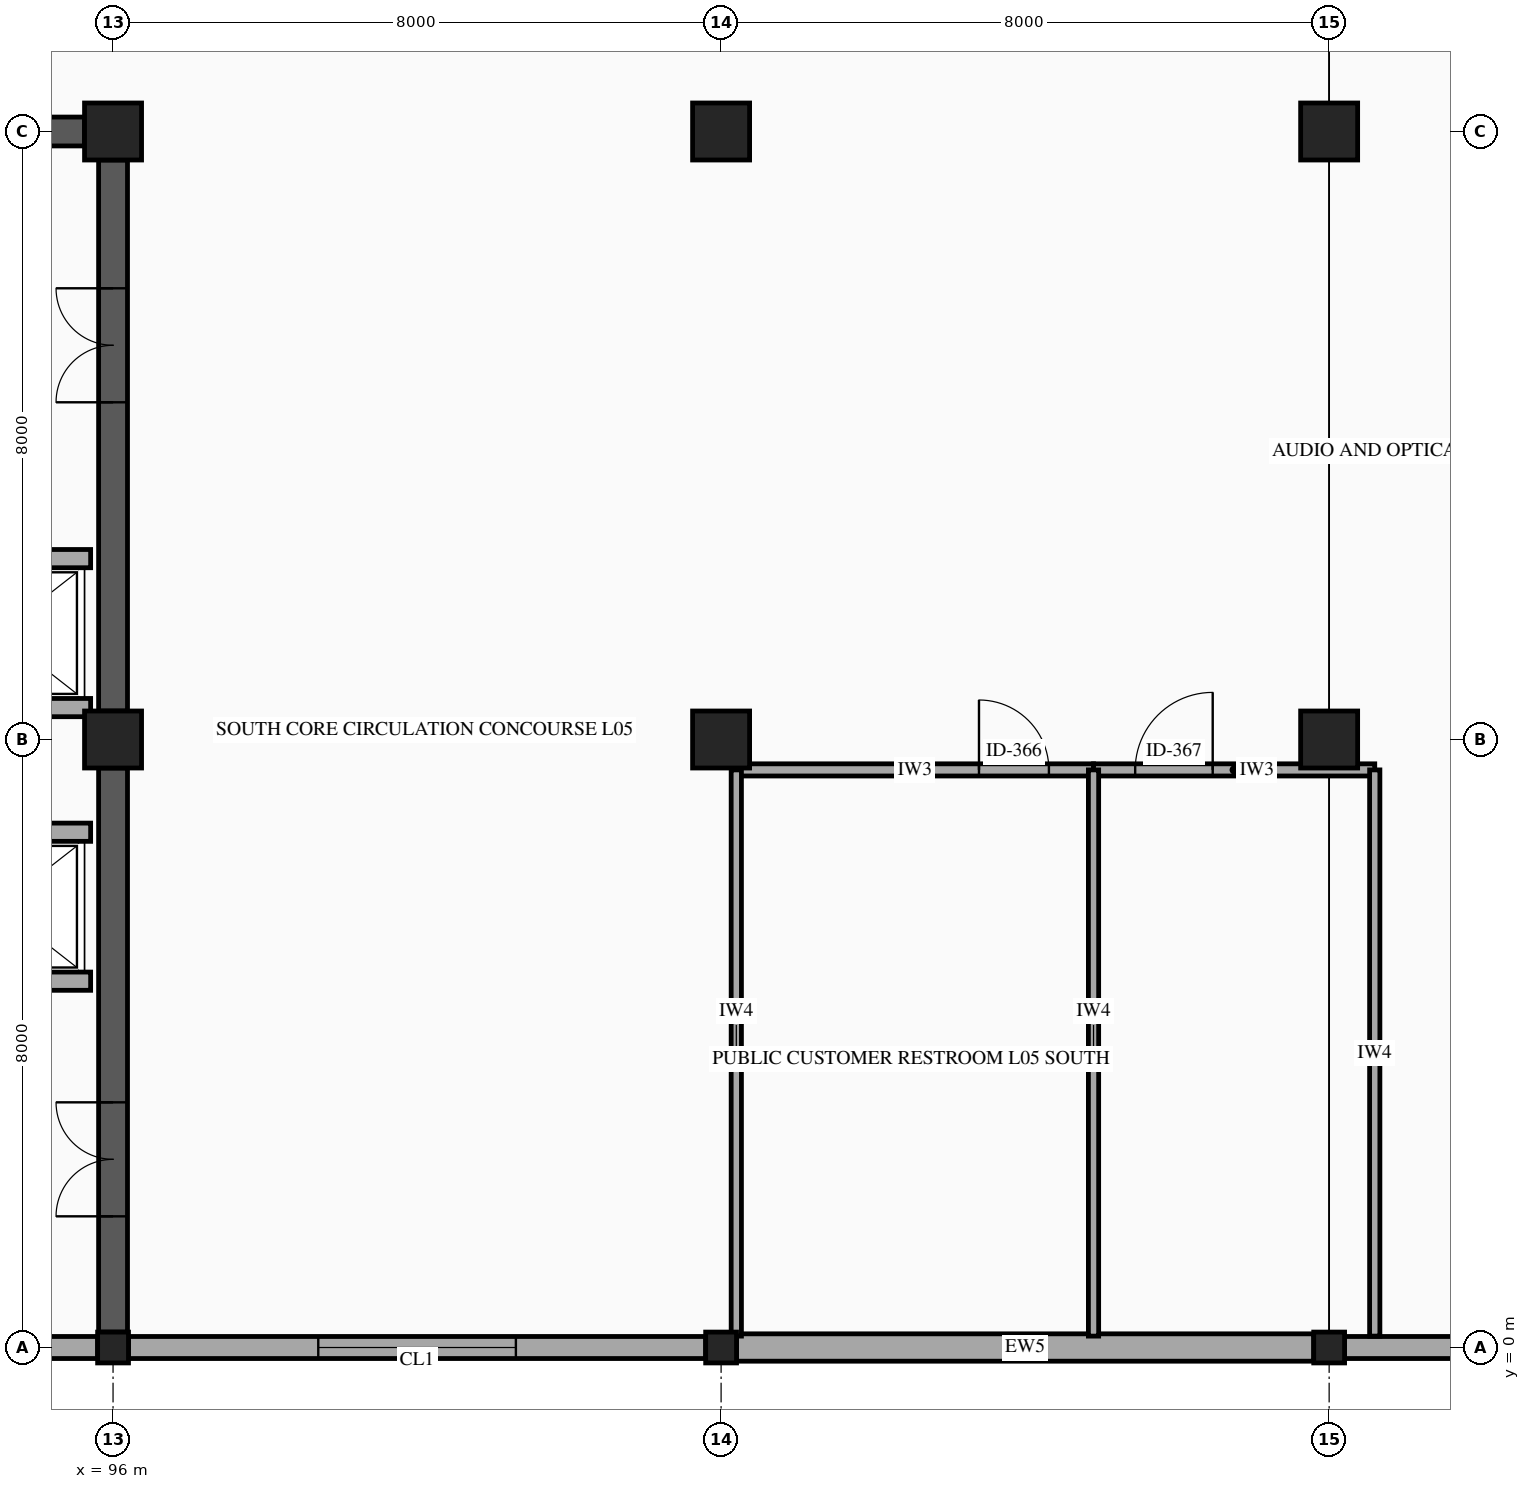
"""IFC4 building model, lengths in metres.
Left out: names, types, materials, properties, quantities, classifications, styles, units other than length and angle.
Written with IfcOpenShell. Run it as: python <this file> out.ifc"""

import sys

from ifc_helpers import new_model, si_unit, direction, frame, frame_2d, origin, origin_2d, place, context, subcontext, project, spatial, rectangle, hollow_rectangle, extrude, element, fill, save


model = new_model("IFC4")
c1 = context("Model", 3, precision=1e-05, world=origin(), true_north=direction((0.0, 1.0)))
c2 = subcontext(c1, "Body", "Model", "MODEL_VIEW")
j1 = project(units=[si_unit("LENGTHUNIT", "METRE"), si_unit("PLANEANGLEUNIT", "RADIAN")], contexts=[c1])
p1 = place(None, origin())
s1 = spatial("IfcSite", under=j1, at=p1, CompositionType="ELEMENT")
p2 = place(p1, origin())
s2 = spatial("IfcBuilding", under=s1, at=p2, CompositionType="ELEMENT")
p3 = place(p2, frame((0.0, 0.0, 23.9)))
s3 = spatial("IfcBuildingStorey", under=s2, at=p3, CompositionType="ELEMENT", Elevation=23.9)
p4 = place(p3, frame((96.0, 0.0, 0.0), z_axis=(0.0, 0.0, 1.0), x_axis=(1.0, 0.0, 0.0)))
e1 = element("IfcColumn", 1, at=p4, inside=s3, PredefinedType="COLUMN", context=c2, shape_type="SweptSolid", body=[
    extrude(hollow_rectangle(XDim=0.406, YDim=0.406, WallThickness=0.015, InnerFilletRadius=0.015, OuterFilletRadius=0.029, at=origin_2d()), origin(), (0.0, 0.0, 1.0), 4.5),
])
for number, where, z_axis, x_axis in (
    (2, (96.0, 8.0, 0.0), (0.0, 0.0, 1.0), (1.0, 0.0, 0.0)),
    (3, (96.0, 16.0, 0.0), (0.0, 0.0, 1.0), (1.0, 0.0, 0.0)),
):
    element("IfcColumn", number, at=place(p3, frame(where, z_axis=z_axis, x_axis=x_axis)), inside=s3, PredefinedType="COLUMN", context=c2, shape_type="SweptSolid", body=[
        extrude(rectangle(XDim=0.75, YDim=0.75, at=origin_2d()), origin(), (0.0, 0.0, 1.0), 4.5),
    ])
p5 = place(p3, frame((104.0, 0.0, 0.0), z_axis=(0.0, 0.0, 1.0), x_axis=(1.0, 0.0, 0.0)))
e4 = element("IfcColumn", 4, at=p5, inside=s3, PredefinedType="COLUMN", context=c2, shape_type="SweptSolid", body=[
    extrude(hollow_rectangle(XDim=0.406, YDim=0.406, WallThickness=0.015, InnerFilletRadius=0.015, OuterFilletRadius=0.029, at=origin_2d()), origin(), (0.0, 0.0, 1.0), 4.5),
])
for number, where, z_axis, x_axis in (
    (5, (104.0, 8.0, 0.0), (0.0, 0.0, 1.0), (1.0, 0.0, 0.0)),
    (6, (104.0, 16.0, 0.0), (0.0, 0.0, 1.0), (1.0, 0.0, 0.0)),
):
    element("IfcColumn", number, at=place(p3, frame(where, z_axis=z_axis, x_axis=x_axis)), inside=s3, PredefinedType="COLUMN", context=c2, shape_type="SweptSolid", body=[
        extrude(rectangle(XDim=0.75, YDim=0.75, at=origin_2d()), origin(), (0.0, 0.0, 1.0), 4.5),
    ])
p6 = place(p3, frame((112.0, 0.0, 0.0), z_axis=(0.0, 0.0, 1.0), x_axis=(1.0, 0.0, 0.0)))
e7 = element("IfcColumn", 7, at=p6, inside=s3, PredefinedType="COLUMN", context=c2, shape_type="SweptSolid", body=[
    extrude(hollow_rectangle(XDim=0.406, YDim=0.406, WallThickness=0.015, InnerFilletRadius=0.015, OuterFilletRadius=0.029, at=origin_2d()), origin(), (0.0, 0.0, 1.0), 4.5),
])
for number, where, z_axis, x_axis in (
    (8, (112.0, 8.0, 0.0), (0.0, 0.0, 1.0), (1.0, 0.0, 0.0)),
    (9, (112.0, 16.0, 0.0), (0.0, 0.0, 1.0), (1.0, 0.0, 0.0)),
):
    element("IfcColumn", number, at=place(p3, frame(where, z_axis=z_axis, x_axis=x_axis)), inside=s3, PredefinedType="COLUMN", context=c2, shape_type="SweptSolid", body=[
        extrude(rectangle(XDim=0.75, YDim=0.75, at=origin_2d()), origin(), (0.0, 0.0, 1.0), 4.5),
    ])
p7 = place(p3, frame((119.797, 0.0, 0.0), z_axis=(0.0, 0.0, 1.0), x_axis=(-1.0, 0.0, 0.0)))
e10 = element("IfcWall", 10, at=p7, inside=s3, PredefinedType="STANDARD", context=c2, shape_type="SweptSolid", body=[
    extrude(rectangle(XDim=7.594, YDim=0.29, at=frame_2d((3.797, 0.0))), origin(), (0.0, 0.0, 1.0), 3.48),
])
p8 = place(p7, frame((2.497, 0.0, 0.8)))
e11 = element("IfcOpeningElement", 11, at=p8, cuts=e10, PredefinedType="OPENING", context=c2, shape_type="SweptSolid", body=[
    extrude(rectangle(XDim=2.6, YDim=1.3, at=frame_2d((1.3, 0.65))), frame((0.0, 0.155, 0.0), z_axis=(0.0, -1.0, 0.0), x_axis=(1.0, 0.0, 0.0)), (0.0, 0.0, 1.0), 0.31),
])
p9 = place(p3, frame((111.797, 0.0, 0.0), z_axis=(0.0, 0.0, 1.0), x_axis=(-1.0, 0.0, 0.0)))
e12 = element("IfcWall", 12, at=p9, inside=s3, PredefinedType="SOLIDWALL", context=c2, shape_type="SweptSolid", body=[
    extrude(rectangle(XDim=7.594, YDim=0.36, at=frame_2d((3.797, 0.0))), origin(), (0.0, 0.0, 1.0), 3.48),
])
p10 = place(p3, frame((103.797, 0.0, 0.0), z_axis=(0.0, 0.0, 1.0), x_axis=(-1.0, 0.0, 0.0)))
e13 = element("IfcWall", 13, at=p10, inside=s3, PredefinedType="STANDARD", context=c2, shape_type="SweptSolid", body=[
    extrude(rectangle(XDim=7.594, YDim=0.29, at=frame_2d((3.797, 0.0))), origin(), (0.0, 0.0, 1.0), 3.48),
])
p11 = place(p10, frame((2.497, 0.0, 0.8)))
e14 = element("IfcOpeningElement", 14, at=p11, cuts=e13, PredefinedType="OPENING", context=c2, shape_type="SweptSolid", body=[
    extrude(rectangle(XDim=2.6, YDim=1.3, at=frame_2d((1.3, 0.65))), frame((0.0, 0.155, 0.0), z_axis=(0.0, -1.0, 0.0), x_axis=(1.0, 0.0, 0.0)), (0.0, 0.0, 1.0), 0.31),
])
p12 = place(p3, frame((95.797, 0.0, 0.0), z_axis=(0.0, 0.0, 1.0), x_axis=(-1.0, 0.0, 0.0)))
e15 = element("IfcWall", 15, at=p12, inside=s3, PredefinedType="STANDARD", context=c2, shape_type="SweptSolid", body=[
    extrude(rectangle(XDim=7.594, YDim=0.29, at=frame_2d((3.797, 0.0))), origin(), (0.0, 0.0, 1.0), 3.48),
])
p13 = place(p3, frame((88.375, 16.0, 0.0), z_axis=(0.0, 0.0, 1.0), x_axis=(1.0, 0.0, 0.0)))
e16 = element("IfcWall", 16, at=p13, inside=s3, PredefinedType="SHEAR", context=c2, shape_type="SweptSolid", body=[
    extrude(rectangle(XDim=7.25, YDim=0.38, at=frame_2d((3.625, 0.0))), origin(), (0.0, 0.0, 1.0), 4.28),
])
p14 = place(p13, frame((2.875, 0.0, 0.0)))
e17 = element("IfcOpeningElement", 17, at=p14, cuts=e16, PredefinedType="OPENING", context=c2, shape_type="SweptSolid", body=[
    extrude(rectangle(XDim=1.5, YDim=2.15, at=frame_2d((0.75, 1.075))), frame((0.0, 0.2, 0.0), z_axis=(0.0, -1.0, 0.0), x_axis=(1.0, 0.0, 0.0)), (0.0, 0.0, 1.0), 0.4),
])
p15 = place(p3, frame((96.0, 0.203, 0.0), z_axis=(0.0, 0.0, 1.0), x_axis=(0.0, 1.0, 0.0)))
e18 = element("IfcWall", 18, at=p15, inside=s3, PredefinedType="SHEAR", context=c2, shape_type="SweptSolid", body=[
    extrude(rectangle(XDim=7.422, YDim=0.38, at=frame_2d((3.711, 0.0))), origin(), (0.0, 0.0, 1.0), 4.28),
])
p16 = place(p15, frame((1.523, 0.0, 0.0)))
e19 = element("IfcOpeningElement", 19, at=p16, cuts=e18, PredefinedType="OPENING", context=c2, shape_type="SweptSolid", body=[
    extrude(rectangle(XDim=1.5, YDim=2.15, at=frame_2d((0.75, 1.075))), frame((0.0, 0.2, 0.0), z_axis=(0.0, -1.0, 0.0), x_axis=(1.0, 0.0, 0.0)), (0.0, 0.0, 1.0), 0.4),
])
p17 = place(p3, frame((96.0, 8.375, 0.0), z_axis=(0.0, 0.0, 1.0), x_axis=(0.0, 1.0, 0.0)))
e20 = element("IfcWall", 20, at=p17, inside=s3, PredefinedType="SHEAR", context=c2, shape_type="SweptSolid", body=[
    extrude(rectangle(XDim=7.25, YDim=0.38, at=frame_2d((3.625, 0.0))), origin(), (0.0, 0.0, 1.0), 4.28),
])
p18 = place(p17, frame((4.062, 0.0, 0.0)))
e21 = element("IfcOpeningElement", 21, at=p18, cuts=e20, PredefinedType="OPENING", context=c2, shape_type="SweptSolid", body=[
    extrude(rectangle(XDim=1.5, YDim=2.15, at=frame_2d((0.75, 1.075))), frame((0.0, 0.2, 0.0), z_axis=(0.0, -1.0, 0.0), x_axis=(1.0, 0.0, 0.0)), (0.0, 0.0, 1.0), 0.4),
])
p19 = place(p3, frame((93.295, 6.78, 0.0), z_axis=(0.0, 0.0, 1.0), x_axis=(1.0, 0.0, 0.0)))
e22 = element("IfcWall", 22, at=p19, inside=s3, PredefinedType="PARTITIONING", context=c2, shape_type="SweptSolid", body=[
    extrude(rectangle(XDim=2.41, YDim=0.24, at=frame_2d((1.205, 0.0))), origin(), (0.0, 0.0, 1.0), 4.28),
])
p20 = place(p19, frame((0.655, 0.0, 0.0)))
e23 = element("IfcOpeningElement", 23, at=p20, cuts=e22, PredefinedType="OPENING", context=c2, shape_type="SweptSolid", body=[
    extrude(rectangle(XDim=1.1, YDim=2.15, at=frame_2d((0.55, 1.075))), frame((0.0, 0.13, 0.0), z_axis=(0.0, -1.0, 0.0), x_axis=(1.0, 0.0, 0.0)), (0.0, 0.0, 1.0), 0.26),
])
p21 = place(p3, frame((93.295, 4.82, 0.0), z_axis=(0.0, 0.0, 1.0), x_axis=(1.0, 0.0, 0.0)))
e24 = element("IfcWall", 24, at=p21, inside=s3, PredefinedType="PARTITIONING", context=c2, shape_type="SweptSolid", body=[
    extrude(rectangle(XDim=2.41, YDim=0.24, at=frame_2d((1.205, 0.0))), origin(), (0.0, 0.0, 1.0), 4.28),
])
p22 = place(p3, frame((93.295, 10.38, 0.0), z_axis=(0.0, 0.0, 1.0), x_axis=(1.0, 0.0, 0.0)))
e25 = element("IfcWall", 25, at=p22, inside=s3, PredefinedType="PARTITIONING", context=c2, shape_type="SweptSolid", body=[
    extrude(rectangle(XDim=2.41, YDim=0.24, at=frame_2d((1.205, 0.0))), origin(), (0.0, 0.0, 1.0), 4.28),
])
p23 = place(p22, frame((0.655, 0.0, 0.0)))
e26 = element("IfcOpeningElement", 26, at=p23, cuts=e25, PredefinedType="OPENING", context=c2, shape_type="SweptSolid", body=[
    extrude(rectangle(XDim=1.1, YDim=2.15, at=frame_2d((0.55, 1.075))), frame((0.0, 0.13, 0.0), z_axis=(0.0, -1.0, 0.0), x_axis=(1.0, 0.0, 0.0)), (0.0, 0.0, 1.0), 0.26),
])
p24 = place(p3, frame((93.295, 8.42, 0.0), z_axis=(0.0, 0.0, 1.0), x_axis=(1.0, 0.0, 0.0)))
e27 = element("IfcWall", 27, at=p24, inside=s3, PredefinedType="PARTITIONING", context=c2, shape_type="SweptSolid", body=[
    extrude(rectangle(XDim=2.41, YDim=0.24, at=frame_2d((1.205, 0.0))), origin(), (0.0, 0.0, 1.0), 4.28),
])
p25 = place(p3, frame((104.2, 7.6, 0.0), z_axis=(0.0, 0.0, 1.0), x_axis=(1.0, 0.0, 0.0)))
e28 = element("IfcWall", 28, at=p25, inside=s3, PredefinedType="PARTITIONING", context=c2, shape_type="SweptSolid", body=[
    extrude(rectangle(XDim=4.7, YDim=0.16, at=frame_2d((2.35, 0.0))), origin(), (0.0, 0.0, 1.0), 3.48),
])
p26 = place(p25, frame((3.193, 0.0, 0.0)))
e29 = element("IfcOpeningElement", 29, at=p26, cuts=e28, PredefinedType="OPENING", context=c2, shape_type="SweptSolid", body=[
    extrude(rectangle(XDim=0.92, YDim=2.1, at=frame_2d((0.46, 1.05))), frame((0.0, 0.09, 0.0), z_axis=(0.0, -1.0, 0.0), x_axis=(1.0, 0.0, 0.0)), (0.0, 0.0, 1.0), 0.18),
])
p27 = place(p3, frame((108.9, 7.6, 0.0), z_axis=(0.0, 0.0, 1.0), x_axis=(1.0, 0.0, 0.0)))
e30 = element("IfcWall", 30, at=p27, inside=s3, PredefinedType="PARTITIONING", context=c2, shape_type="SweptSolid", body=[
    extrude(rectangle(XDim=3.7, YDim=0.16, at=frame_2d((1.85, 0.0))), origin(), (0.0, 0.0, 1.0), 3.48),
])
p28 = place(p27, frame((0.548, 0.0, 0.0)))
e31 = element("IfcOpeningElement", 31, at=p28, cuts=e30, PredefinedType="OPENING", context=c2, shape_type="SweptSolid", body=[
    extrude(rectangle(XDim=1.02, YDim=2.1, at=frame_2d((0.51, 1.05))), frame((0.0, 0.09, 0.0), z_axis=(0.0, -1.0, 0.0), x_axis=(1.0, 0.0, 0.0)), (0.0, 0.0, 1.0), 0.18),
])
for number, where, z_axis, x_axis in (
    (32, (104.2, 0.15, 0.0), (0.0, 0.0, 1.0), (0.0, 1.0, 0.0)),
    (33, (108.9, 0.15, 0.0), (0.0, 0.0, 1.0), (0.0, 1.0, 0.0)),
    (34, (112.6, 0.15, 0.0), (0.0, 0.0, 1.0), (0.0, 1.0, 0.0)),
):
    element("IfcWall", number, at=place(p3, frame(where, z_axis=z_axis, x_axis=x_axis)), inside=s3, PredefinedType="PARTITIONING", context=c2, shape_type="SweptSolid", body=[
        extrude(rectangle(XDim=7.45, YDim=0.135, at=frame_2d((3.725, 0.0))), origin(), (0.0, 0.0, 1.0), 3.48),
    ])
p29 = place(p11, origin())
e35 = element("IfcWindow", 35, at=p29, inside=s3, PartitioningType="DOUBLE_PANEL_VERTICAL", PredefinedType="WINDOW", context=c2, shape_type="SweptSolid", body=[
    extrude(rectangle(XDim=2.6, YDim=1.3, at=frame_2d((1.3, 0.65))), frame((0.0, 0.03, 0.0), z_axis=(0.0, -1.0, 0.0), x_axis=(1.0, 0.0, 0.0)), (0.0, 0.0, 1.0), 0.06),
])
fill(e14, e35)
p30 = place(p16, origin())
e36 = element("IfcDoor", 36, at=p30, inside=s3, OperationType="DOUBLE_DOOR_SINGLE_SWING", PredefinedType="DOOR", context=c2, shape_type="SweptSolid", body=[
    extrude(rectangle(XDim=1.5, YDim=2.15, at=frame_2d((0.75, 1.075))), frame((0.0, 0.025, 0.0), z_axis=(0.0, -1.0, 0.0), x_axis=(1.0, 0.0, 0.0)), (0.0, 0.0, 1.0), 0.05),
])
fill(e19, e36)
p31 = place(p18, origin())
e37 = element("IfcDoor", 37, at=p31, inside=s3, OperationType="DOUBLE_DOOR_SINGLE_SWING", PredefinedType="DOOR", context=c2, shape_type="SweptSolid", body=[
    extrude(rectangle(XDim=1.5, YDim=2.15, at=frame_2d((0.75, 1.075))), frame((0.0, 0.025, 0.0), z_axis=(0.0, -1.0, 0.0), x_axis=(1.0, 0.0, 0.0)), (0.0, 0.0, 1.0), 0.05),
])
fill(e21, e37)
p32 = place(p26, origin())
e38 = element("IfcDoor", 38, at=p32, inside=s3, OperationType="SINGLE_SWING_LEFT", PredefinedType="DOOR", context=c2, shape_type="SweptSolid", body=[
    extrude(rectangle(XDim=0.92, YDim=2.1, at=frame_2d((0.46, 1.05))), frame((0.0, 0.025, 0.0), z_axis=(0.0, -1.0, 0.0), x_axis=(1.0, 0.0, 0.0)), (0.0, 0.0, 1.0), 0.05),
])
fill(e29, e38)
p33 = place(p28, origin())
e39 = element("IfcDoor", 39, at=p33, inside=s3, OperationType="SINGLE_SWING_RIGHT", PredefinedType="DOOR", context=c2, shape_type="SweptSolid", body=[
    extrude(rectangle(XDim=1.02, YDim=2.1, at=frame_2d((0.51, 1.05))), frame((0.0, 0.025, 0.0), z_axis=(0.0, -1.0, 0.0), x_axis=(1.0, 0.0, 0.0)), (0.0, 0.0, 1.0), 0.05),
])
fill(e31, e39)
save(model, sys.argv[1])
